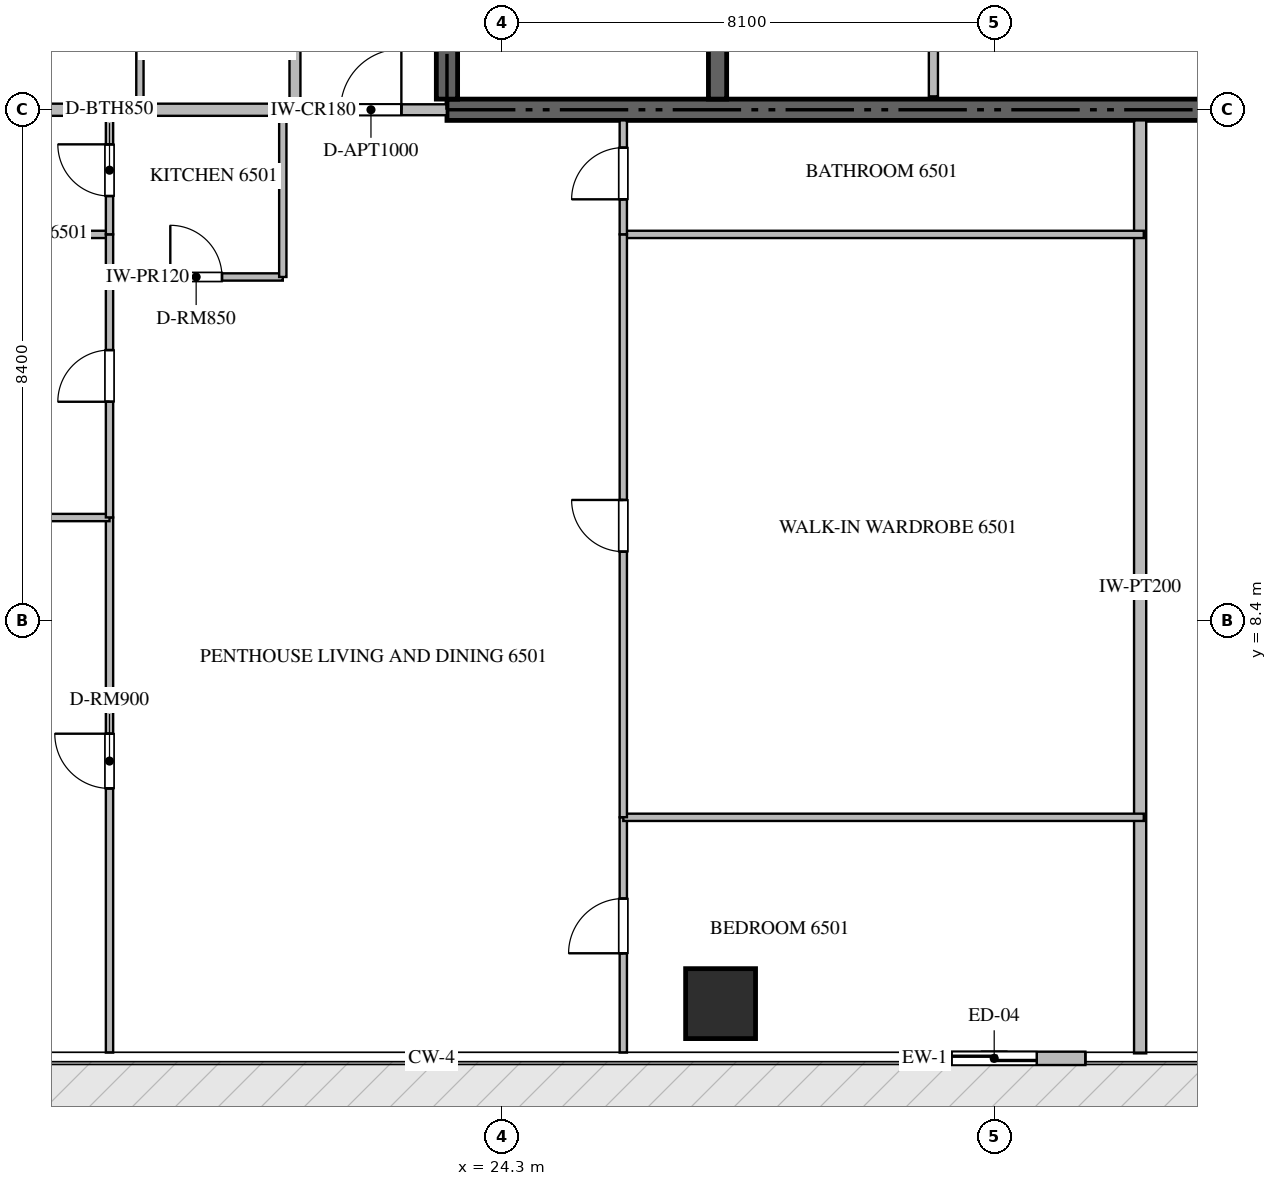
"""IFC4 building model, lengths in metres.
Left out: names, types, materials, properties, quantities, classifications, styles, units other than length and angle.
Written with IfcOpenShell. Run it as: python <this file> out.ifc"""

import sys

from ifc_helpers import new_model, si_unit, direction, frame, frame_2d, origin, origin_2d, place, context, subcontext, project, spatial, rectangle, extrude, source, transform, mapped, element, fill, save


model = new_model("IFC4")
c1 = context("Model", 3, precision=1e-05, world=origin(), true_north=direction((0.0, 1.0)))
c2 = subcontext(c1, "Body", "Model", "MODEL_VIEW")
j1 = project(units=[si_unit("LENGTHUNIT", "METRE"), si_unit("PLANEANGLEUNIT", "RADIAN")], contexts=[c1])
p1 = place(None, origin())
s1 = spatial("IfcSite", under=j1, at=p1, CompositionType="ELEMENT")
p2 = place(p1, origin())
s2 = spatial("IfcBuilding", under=s1, at=p2, CompositionType="ELEMENT")
p3 = place(p2, frame((0.0, 0.0, 260.5)))
s3 = spatial("IfcBuildingStorey", under=s2, at=p3, CompositionType="ELEMENT", Elevation=260.5)
p4 = place(p3, frame((23.4, 16.8, -0.26), z_axis=(0.0, 0.0, 1.0), x_axis=(1.0, 0.0, 0.0)))
e1 = element("IfcWall", 1, at=p4, inside=s3, PredefinedType="SHEAR", context=c2, shape_type="SweptSolid", body=[
    extrude(rectangle(XDim=18.0, YDim=0.35, at=frame_2d((9.0, 0.0))), origin(), (0.0, 0.0, 1.0), 3.848),
])
p5 = place(p3, frame((23.4, 16.975, -0.26), z_axis=(0.0, 0.0, 1.0), x_axis=(0.0, 1.0, 0.0)))
e2 = element("IfcWall", 2, at=p5, inside=s3, PredefinedType="SHEAR", context=c2, shape_type="SweptSolid", body=[
    extrude(rectangle(XDim=4.875, YDim=0.35, at=frame_2d((2.438, 0.0))), origin(), (0.0, 0.0, 1.0), 3.848),
])
p6 = place(p3, frame((27.85, 16.975, -0.26), z_axis=(0.0, 0.0, 1.0), x_axis=(0.0, 1.0, 0.0)))
e3 = element("IfcWall", 3, at=p6, inside=s3, PredefinedType="SHEAR", context=c2, shape_type="SweptSolid", body=[
    extrude(rectangle(XDim=4.875, YDim=0.3, at=frame_2d((2.438, 0.0))), origin(), (0.0, 0.0, 1.0), 3.848),
])
m1 = source(origin(), c2, "Body", "SweptSolid", [
    extrude(rectangle(XDim=1.15, YDim=1.15, at=origin_2d()), origin(), (0.0, 0.0, 1.0), 3.85),
])
p7 = place(p3, frame((27.9, 2.1, -0.26), z_axis=(0.0, 0.0, 1.0), x_axis=(1.0, 0.0, 0.0)))
e4 = element("IfcColumn", 4, at=p7, inside=s3, PredefinedType="COLUMN", context=c2, shape_type="MappedRepresentation", body=[
    mapped(m1, transform((0.0, 0.0, 0.0), scale=1.0)),
])
p8 = place(p3, frame((30.9, 1.2, 0.0), z_axis=(0.0, 0.0, 1.0), x_axis=(1.0, 0.0, 0.0)))
e5 = element("IfcWall", 5, at=p8, inside=s3, PredefinedType="ELEMENTEDWALL", context=c2, shape_type="SweptSolid", body=[
    extrude(rectangle(XDim=3.0, YDim=0.22, at=frame_2d((1.5, 0.0))), origin(), (0.0, 0.0, 1.0), 3.575),
])
p9 = place(p8, frame((0.8, 0.0, 0.0)))
e6 = element("IfcOpeningElement", 6, at=p9, cuts=e5, PredefinedType="OPENING", context=c2, shape_type="SweptSolid", body=[
    extrude(rectangle(XDim=1.4, YDim=2.25, at=frame_2d((0.7, 1.125))), frame((0.0, 0.12, 0.0), z_axis=(0.0, -1.0, 0.0), x_axis=(1.0, 0.0, 0.0)), (0.0, 0.0, 1.0), 0.24),
])
p10 = place(p3, frame((31.4, 17.02, 0.0), z_axis=(0.0, 0.0, 1.0), x_axis=(0.0, 1.0, 0.0)))
e7 = element("IfcWall", 7, at=p10, inside=s3, PredefinedType="PARTITIONING", context=c2, shape_type="SweptSolid", body=[
    extrude(rectangle(XDim=2.73, YDim=0.15, at=frame_2d((1.365, 0.0))), origin(), (0.0, 0.0, 1.0), 3.59),
])
p11 = place(p3, frame((34.8, 1.282, 0.0), z_axis=(0.0, 0.0, 1.0), x_axis=(0.0, 1.0, 0.0)))
e8 = element("IfcWall", 8, at=p11, inside=s3, PredefinedType="PARTITIONING", context=c2, shape_type="SweptSolid", body=[
    extrude(rectangle(XDim=15.343, YDim=0.2, at=frame_2d((7.671, 0.0))), origin(), (0.0, 0.0, 1.0), 3.59),
])
p12 = place(p3, frame((7.482, 16.8, 0.0), z_axis=(0.0, 0.0, 1.0), x_axis=(1.0, 0.0, 0.0)))
e9 = element("IfcWall", 9, at=p12, inside=s3, PredefinedType="PARTITIONING", context=c2, shape_type="SweptSolid", body=[
    extrude(rectangle(XDim=13.418, YDim=0.2, at=frame_2d((6.709, 0.0))), origin(), (0.0, 0.0, 1.0), 3.59),
])
p13 = place(p3, frame((20.902, 16.8, 0.0), z_axis=(0.0, 0.0, 1.0), x_axis=(1.0, 0.0, 0.0)))
e10 = element("IfcWall", 10, at=p13, inside=s3, PredefinedType="PARTITIONING", context=c2, shape_type="SweptSolid", body=[
    extrude(rectangle(XDim=2.496, YDim=0.18, at=frame_2d((1.248, 0.0))), origin(), (0.0, 0.0, 1.0), 3.59),
])
p14 = place(p13, frame((0.748, 0.0, 0.0)))
e11 = element("IfcOpeningElement", 11, at=p14, cuts=e10, PredefinedType="OPENING", context=c2, shape_type="SweptSolid", body=[
    extrude(rectangle(XDim=1.0, YDim=2.15, at=frame_2d((0.5, 1.075))), frame((0.0, 0.1, 0.0), z_axis=(0.0, -1.0, 0.0), x_axis=(1.0, 0.0, 0.0)), (0.0, 0.0, 1.0), 0.2),
])
p15 = place(p3, frame((20.9, 16.8, 0.0), z_axis=(0.0, 0.0, 1.0), x_axis=(0.0, 1.0, 0.0)))
e12 = element("IfcWall", 12, at=p15, inside=s3, PredefinedType="PARTITIONING", context=c2, shape_type="SweptSolid", body=[
    extrude(rectangle(XDim=16.8, YDim=0.18, at=frame_2d((8.4, 0.0))), origin(), (0.0, 0.0, 1.0), 3.59),
])
p16 = place(p15, frame((4.803, 0.0, 0.0)))
e13 = element("IfcOpeningElement", 13, at=p16, cuts=e12, PredefinedType="OPENING", context=c2, shape_type="SweptSolid", body=[
    extrude(rectangle(XDim=1.0, YDim=2.15, at=frame_2d((0.5, 1.075))), frame((0.0, 0.1, 0.0), z_axis=(0.0, -1.0, 0.0), x_axis=(1.0, 0.0, 0.0)), (0.0, 0.0, 1.0), 0.2),
])
p17 = place(p15, frame((13.225, 0.0, 0.0)))
e14 = element("IfcOpeningElement", 14, at=p17, cuts=e12, PredefinedType="OPENING", context=c2, shape_type="SweptSolid", body=[
    extrude(rectangle(XDim=1.0, YDim=2.15, at=frame_2d((0.5, 1.075))), frame((0.0, 0.1, 0.0), z_axis=(0.0, -1.0, 0.0), x_axis=(1.0, 0.0, 0.0)), (0.0, 0.0, 1.0), 0.2),
])
p18 = place(p3, frame((17.85, 14.05, 0.0), z_axis=(0.0, 0.0, 1.0), x_axis=(1.0, 0.0, 0.0)))
e15 = element("IfcWall", 15, at=p18, inside=s3, PredefinedType="PARTITIONING", context=c2, shape_type="SweptSolid", body=[
    extrude(rectangle(XDim=2.85, YDim=0.12, at=frame_2d((1.425, 0.0))), origin(), (0.0, 0.0, 1.0), 3.59),
])
p19 = place(p18, frame((1.0, 0.0, 0.0)))
e16 = element("IfcOpeningElement", 16, at=p19, cuts=e15, PredefinedType="OPENING", context=c2, shape_type="SweptSolid", body=[
    extrude(rectangle(XDim=0.85, YDim=2.1, at=frame_2d((0.425, 1.05))), frame((0.0, 0.07, 0.0), z_axis=(0.0, -1.0, 0.0), x_axis=(1.0, 0.0, 0.0)), (0.0, 0.0, 1.0), 0.14),
])
p20 = place(p3, frame((20.7, 14.05, 0.0), z_axis=(0.0, 0.0, 1.0), x_axis=(0.0, 1.0, 0.0)))
e17 = element("IfcWall", 17, at=p20, inside=s3, PredefinedType="PARTITIONING", context=c2, shape_type="SweptSolid", body=[
    extrude(rectangle(XDim=2.81, YDim=0.12, at=frame_2d((1.405, 0.0))), origin(), (0.0, 0.0, 1.0), 3.59),
])
p21 = place(p3, frame((17.85, 1.295, 0.0), z_axis=(0.0, 0.0, 1.0), x_axis=(0.0, 1.0, 0.0)))
e18 = element("IfcWall", 18, at=p21, inside=s3, PredefinedType="PARTITIONING", context=c2, shape_type="SweptSolid", body=[
    extrude(rectangle(XDim=8.799, YDim=0.12, at=frame_2d((4.399, 0.0))), origin(), (0.0, 0.0, 1.0), 3.59),
])
p22 = place(p21, frame((4.344, 0.0, 0.0)))
e19 = element("IfcOpeningElement", 19, at=p22, cuts=e18, PredefinedType="OPENING", context=c2, shape_type="SweptSolid", body=[
    extrude(rectangle(XDim=0.9, YDim=2.1, at=frame_2d((0.45, 1.05))), frame((0.0, 0.07, 0.0), z_axis=(0.0, -1.0, 0.0), x_axis=(1.0, 0.0, 0.0)), (0.0, 0.0, 1.0), 0.14),
])
p23 = place(p3, frame((7.495, 10.094, 0.0), z_axis=(0.0, 0.0, 1.0), x_axis=(1.0, 0.0, 0.0)))
e20 = element("IfcWall", 20, at=p23, inside=s3, PredefinedType="PARTITIONING", context=c2, shape_type="SweptSolid", body=[
    extrude(rectangle(XDim=10.355, YDim=0.12, at=frame_2d((5.177, 0.0))), origin(), (0.0, 0.0, 1.0), 3.122),
])
p24 = place(p3, frame((14.65, 14.75, 0.0), z_axis=(0.0, 0.0, 1.0), x_axis=(1.0, 0.0, 0.0)))
e21 = element("IfcWall", 21, at=p24, inside=s3, PredefinedType="PARTITIONING", context=c2, shape_type="SweptSolid", body=[
    extrude(rectangle(XDim=3.2, YDim=0.12, at=frame_2d((1.6, 0.0))), origin(), (0.0, 0.0, 1.0), 3.59),
])
p25 = place(p3, frame((17.85, 10.096, 0.0), z_axis=(0.0, 0.0, 1.0), x_axis=(0.0, 1.0, 0.0)))
e22 = element("IfcWall", 22, at=p25, inside=s3, PredefinedType="PARTITIONING", context=c2, shape_type="SweptSolid", body=[
    extrude(rectangle(XDim=4.654, YDim=0.12, at=frame_2d((2.327, 0.0))), origin(), (0.0, 0.0, 1.0), 3.59),
])
p26 = place(p25, frame((1.902, 0.0, 0.0)))
e23 = element("IfcOpeningElement", 23, at=p26, cuts=e22, PredefinedType="OPENING", context=c2, shape_type="SweptSolid", body=[
    extrude(rectangle(XDim=0.85, YDim=2.1, at=frame_2d((0.425, 1.05))), frame((0.0, 0.07, 0.0), z_axis=(0.0, -1.0, 0.0), x_axis=(1.0, 0.0, 0.0)), (0.0, 0.0, 1.0), 0.14),
])
p27 = place(p3, frame((17.85, 14.752, 0.0), z_axis=(0.0, 0.0, 1.0), x_axis=(0.0, 1.0, 0.0)))
e24 = element("IfcWall", 24, at=p27, inside=s3, PredefinedType="PARTITIONING", context=c2, shape_type="SweptSolid", body=[
    extrude(rectangle(XDim=2.108, YDim=0.12, at=frame_2d((1.054, 0.0))), origin(), (0.0, 0.0, 1.0), 3.59),
])
p28 = place(p27, frame((0.629, 0.0, 0.0)))
e25 = element("IfcOpeningElement", 25, at=p28, cuts=e24, PredefinedType="OPENING", context=c2, shape_type="SweptSolid", body=[
    extrude(rectangle(XDim=0.85, YDim=2.1, at=frame_2d((0.425, 1.05))), frame((0.0, 0.07, 0.0), z_axis=(0.0, -1.0, 0.0), x_axis=(1.0, 0.0, 0.0)), (0.0, 0.0, 1.0), 0.14),
])
p29 = place(p3, frame((26.3, 1.295, 0.0), z_axis=(0.0, 0.0, 1.0), x_axis=(0.0, 1.0, 0.0)))
e26 = element("IfcWall", 26, at=p29, inside=s3, PredefinedType="PARTITIONING", context=c2, shape_type="SweptSolid", body=[
    extrude(rectangle(XDim=3.869, YDim=0.12, at=frame_2d((1.935, 0.0))), origin(), (0.0, 0.0, 1.0), 3.59),
])
p30 = place(p29, frame((1.633, 0.0, 0.0)))
e27 = element("IfcOpeningElement", 27, at=p30, cuts=e26, PredefinedType="OPENING", context=c2, shape_type="SweptSolid", body=[
    extrude(rectangle(XDim=0.9, YDim=2.1, at=frame_2d((0.45, 1.05))), frame((0.0, 0.07, 0.0), z_axis=(0.0, -1.0, 0.0), x_axis=(1.0, 0.0, 0.0)), (0.0, 0.0, 1.0), 0.14),
])
for number, where, z_axis, x_axis in (
    (28, (26.3, 5.164, 0.0), (0.0, 0.0, 1.0), (1.0, 0.0, 0.0)),
    (29, (26.3, 14.75, 0.0), (0.0, 0.0, 1.0), (1.0, 0.0, 0.0)),
):
    element("IfcWall", number, at=place(p3, frame(where, z_axis=z_axis, x_axis=x_axis)), inside=s3, PredefinedType="PARTITIONING", context=c2, shape_type="SweptSolid", body=[
        extrude(rectangle(XDim=8.56, YDim=0.12, at=frame_2d((4.28, 0.0))), origin(), (0.0, 0.0, 1.0), 3.59),
    ])
p31 = place(p3, frame((26.3, 5.166, 0.0), z_axis=(0.0, 0.0, 1.0), x_axis=(0.0, 1.0, 0.0)))
e30 = element("IfcWall", 30, at=p31, inside=s3, PredefinedType="PARTITIONING", context=c2, shape_type="SweptSolid", body=[
    extrude(rectangle(XDim=9.584, YDim=0.12, at=frame_2d((4.792, 0.0))), origin(), (0.0, 0.0, 1.0), 3.59),
])
p32 = place(p31, frame((4.367, 0.0, 0.0)))
e31 = element("IfcOpeningElement", 31, at=p32, cuts=e30, PredefinedType="OPENING", context=c2, shape_type="SweptSolid", body=[
    extrude(rectangle(XDim=0.85, YDim=2.1, at=frame_2d((0.425, 1.05))), frame((0.0, 0.07, 0.0), z_axis=(0.0, -1.0, 0.0), x_axis=(1.0, 0.0, 0.0)), (0.0, 0.0, 1.0), 0.14),
])
p33 = place(p3, frame((26.3, 14.752, 0.0), z_axis=(0.0, 0.0, 1.0), x_axis=(0.0, 1.0, 0.0)))
e32 = element("IfcWall", 32, at=p33, inside=s3, PredefinedType="PARTITIONING", context=c2, shape_type="SweptSolid", body=[
    extrude(rectangle(XDim=1.873, YDim=0.12, at=frame_2d((0.937, 0.0))), origin(), (0.0, 0.0, 1.0), 3.59),
])
p34 = place(p33, frame((0.575, 0.0, 0.0)))
e33 = element("IfcOpeningElement", 33, at=p34, cuts=e32, PredefinedType="OPENING", context=c2, shape_type="SweptSolid", body=[
    extrude(rectangle(XDim=0.85, YDim=2.1, at=frame_2d((0.425, 1.05))), frame((0.0, 0.07, 0.0), z_axis=(0.0, -1.0, 0.0), x_axis=(1.0, 0.0, 0.0)), (0.0, 0.0, 1.0), 0.14),
])
p35 = place(p3, frame((18.35, 16.74, 0.0), z_axis=(0.0, 0.0, 1.0), x_axis=(0.0, 1.0, 0.0)))
e34 = element("IfcWall", 34, at=p35, inside=s3, PredefinedType="PARTITIONING", context=c2, shape_type="SweptSolid", body=[
    extrude(rectangle(XDim=2.66, YDim=0.12, at=frame_2d((1.33, 0.0))), origin(), (0.0, 0.0, 1.0), 3.59),
])
m2 = source(origin(), c2, "Body", "SweptSolid", [
    extrude(rectangle(XDim=1.4, YDim=2.25, at=frame_2d((0.7, 1.125))), frame((0.0, 0.025, 0.0), z_axis=(0.0, -1.0, 0.0), x_axis=(1.0, 0.0, 0.0)), (0.0, 0.0, 1.0), 0.05),
])
p36 = place(p9, origin())
e35 = element("IfcDoor", 35, at=p36, inside=s3, OperationType="SLIDING_TO_LEFT", PredefinedType="DOOR", context=c2, shape_type="MappedRepresentation", body=[
    mapped(m2, transform((0.0, 0.0, 0.0), scale=1.0)),
])
fill(e6, e35)
m3 = source(origin(), c2, "Body", "SweptSolid", [
    extrude(rectangle(XDim=1.0, YDim=2.15, at=frame_2d((0.5, 1.075))), frame((0.0, 0.025, 0.0), z_axis=(0.0, -1.0, 0.0), x_axis=(1.0, 0.0, 0.0)), (0.0, 0.0, 1.0), 0.05),
])
p37 = place(p14, origin())
e36 = element("IfcDoor", 36, at=p37, inside=s3, OperationType="SINGLE_SWING_RIGHT", PredefinedType="DOOR", context=c2, shape_type="MappedRepresentation", body=[
    mapped(m3, transform((0.0, 0.0, 0.0), scale=1.0)),
])
fill(e11, e36)
m4 = source(origin(), c2, "Body", "SweptSolid", [
    extrude(rectangle(XDim=0.85, YDim=2.1, at=frame_2d((0.425, 1.05))), frame((0.0, 0.025, 0.0), z_axis=(0.0, -1.0, 0.0), x_axis=(1.0, 0.0, 0.0)), (0.0, 0.0, 1.0), 0.05),
])
p38 = place(p19, origin())
e37 = element("IfcDoor", 37, at=p38, inside=s3, OperationType="SINGLE_SWING_LEFT", PredefinedType="DOOR", context=c2, shape_type="MappedRepresentation", body=[
    mapped(m4, transform((0.0, 0.0, 0.0), scale=1.0)),
])
fill(e16, e37)
m5 = source(origin(), c2, "Body", "SweptSolid", [
    extrude(rectangle(XDim=0.9, YDim=2.1, at=frame_2d((0.45, 1.05))), frame((0.0, 0.025, 0.0), z_axis=(0.0, -1.0, 0.0), x_axis=(1.0, 0.0, 0.0)), (0.0, 0.0, 1.0), 0.05),
])
p39 = place(p22, origin())
e38 = element("IfcDoor", 38, at=p39, inside=s3, OperationType="SINGLE_SWING_RIGHT", PredefinedType="DOOR", context=c2, shape_type="MappedRepresentation", body=[
    mapped(m5, transform((0.0, 0.0, 0.0), scale=1.0)),
])
fill(e19, e38)
p40 = place(p26, origin())
e39 = element("IfcDoor", 39, at=p40, inside=s3, OperationType="SINGLE_SWING_LEFT", PredefinedType="DOOR", context=c2, shape_type="MappedRepresentation", body=[
    mapped(m4, transform((0.0, 0.0, 0.0), scale=1.0)),
])
fill(e23, e39)
p41 = place(p28, origin())
e40 = element("IfcDoor", 40, at=p41, inside=s3, OperationType="SINGLE_SWING_RIGHT", PredefinedType="DOOR", context=c2, shape_type="MappedRepresentation", body=[
    mapped(m4, transform((0.0, 0.0, 0.0), scale=1.0)),
])
fill(e25, e40)
p42 = place(p30, origin())
e41 = element("IfcDoor", 41, at=p42, inside=s3, OperationType="SINGLE_SWING_LEFT", PredefinedType="DOOR", context=c2, shape_type="MappedRepresentation", body=[
    mapped(m5, transform((0.0, 0.0, 0.0), scale=1.0)),
])
fill(e27, e41)
p43 = place(p32, origin())
e42 = element("IfcDoor", 42, at=p43, inside=s3, OperationType="SINGLE_SWING_RIGHT", PredefinedType="DOOR", context=c2, shape_type="MappedRepresentation", body=[
    mapped(m4, transform((0.0, 0.0, 0.0), scale=1.0)),
])
fill(e31, e42)
p44 = place(p34, origin())
e43 = element("IfcDoor", 43, at=p44, inside=s3, OperationType="SINGLE_SWING_LEFT", PredefinedType="DOOR", context=c2, shape_type="MappedRepresentation", body=[
    mapped(m4, transform((0.0, 0.0, 0.0), scale=1.0)),
])
fill(e33, e43)
save(model, sys.argv[1])
